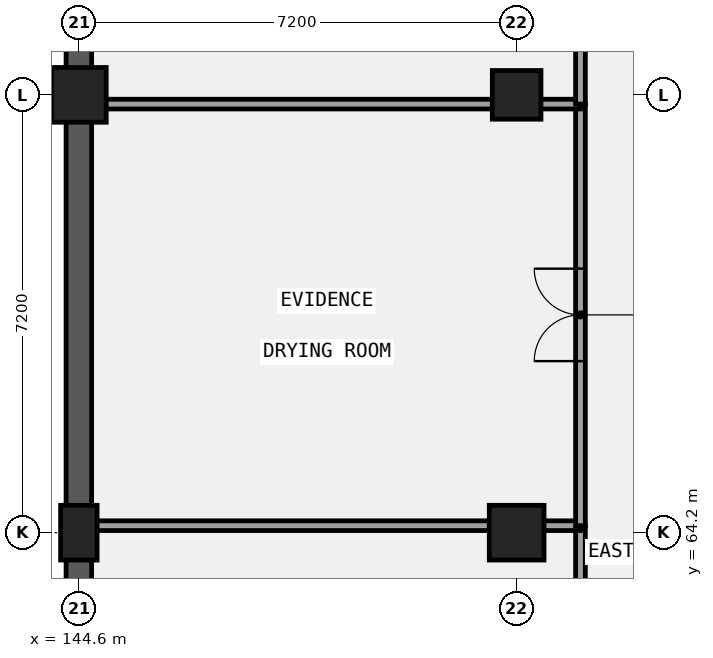
"""IFC4 building model, lengths in metres.
Left out: names, types, materials, properties, quantities, classifications, styles, units other than length and angle.
Written with IfcOpenShell. Run it as: python <this file> out.ifc"""

import sys

from ifc_helpers import new_model, si_unit, direction, frame, frame_2d, origin, origin_2d, place, context, subcontext, project, spatial, rectangle, extrude, element, fill, save


model = new_model("IFC4")
c1 = context("Model", 3, precision=1e-05, world=origin(), true_north=direction((0.0, 1.0)))
c2 = subcontext(c1, "Body", "Model", "MODEL_VIEW")
j1 = project(units=[si_unit("LENGTHUNIT", "METRE"), si_unit("PLANEANGLEUNIT", "RADIAN")], contexts=[c1])
p1 = place(None, origin())
s1 = spatial("IfcSite", under=j1, at=p1, CompositionType="ELEMENT")
p2 = place(p1, origin())
s2 = spatial("IfcBuilding", under=s1, at=p2, CompositionType="ELEMENT")
p3 = place(p2, frame((0.0, 0.0, -4.2)))
s3 = spatial("IfcBuildingStorey", under=s2, at=p3, CompositionType="ELEMENT", Elevation=-4.2)
p4 = place(p3, frame((144.6, 35.6, 0.0), z_axis=(0.0, 0.0, 1.0), x_axis=(0.0, 1.0, 0.0)))
e1 = element("IfcWall", 1, at=p4, inside=s3, PredefinedType="USERDEFINED", context=c2, shape_type="SweptSolid", body=[
    extrude(rectangle(XDim=42.8, YDim=0.42, at=frame_2d((21.4, 0.0))), origin(), (0.0, 0.0, 1.0), 2.98),
])
p5 = place(p3, frame((144.6, 64.2, 0.0), z_axis=(0.0, 0.0, 1.0), x_axis=(1.0, 0.0, 0.0)))
e2 = element("IfcColumn", 2, at=p5, inside=s3, PredefinedType="COLUMN", context=c2, shape_type="SweptSolid", body=[
    extrude(rectangle(XDim=0.6, YDim=0.9, at=origin_2d()), origin(), (0.0, 0.0, 1.0), 4.2),
])
for number, where, z_axis, x_axis in (
    (3, (144.6, 71.4, 0.0), (0.0, 0.0, 1.0), (1.0, 0.0, 0.0)),
    (4, (151.8, 64.2, 0.0), (0.0, 0.0, 1.0), (1.0, 0.0, 0.0)),
):
    element("IfcColumn", number, at=place(p3, frame(where, z_axis=z_axis, x_axis=x_axis)), inside=s3, PredefinedType="COLUMN", context=c2, shape_type="SweptSolid", body=[
        extrude(rectangle(XDim=0.9, YDim=0.9, at=origin_2d()), origin(), (0.0, 0.0, 1.0), 4.2),
    ])
p6 = place(p3, frame((151.8, 71.4, 0.0), z_axis=(0.0, 0.0, 1.0), x_axis=(1.0, 0.0, 0.0)))
e5 = element("IfcColumn", 5, at=p6, inside=s3, PredefinedType="COLUMN", context=c2, shape_type="SweptSolid", body=[
    extrude(rectangle(XDim=0.8, YDim=0.8, at=origin_2d()), origin(), (0.0, 0.0, 1.0), 4.2),
])
p7 = place(p3, frame((152.85, 57.383, 0.0), z_axis=(0.0, 0.0, 1.0), x_axis=(0.0, 1.0, 0.0)))
e6 = element("IfcWall", 6, at=p7, inside=s3, PredefinedType="PARTITIONING", context=c2, shape_type="SweptSolid", body=[
    extrude(rectangle(XDim=6.932, YDim=0.16, at=frame_2d((3.466, 0.0))), origin(), (0.0, 0.0, 1.0), 3.88),
])
p8 = place(p7, frame((2.706, 0.0, 0.0)))
e7 = element("IfcOpeningElement", 7, at=p8, cuts=e6, PredefinedType="OPENING", context=c2, shape_type="SweptSolid", body=[
    extrude(rectangle(XDim=1.52, YDim=2.1, at=frame_2d((0.76, 1.05))), frame((0.0, 0.09, 0.0), z_axis=(0.0, -1.0, 0.0), x_axis=(1.0, 0.0, 0.0)), (0.0, 0.0, 1.0), 0.18),
])
p9 = place(p3, frame((144.78, 64.315, 0.0), z_axis=(0.0, 0.0, 1.0), x_axis=(1.0, 0.0, 0.0)))
e8 = element("IfcWall", 8, at=p9, inside=s3, PredefinedType="PARTITIONING", context=c2, shape_type="SweptSolid", body=[
    extrude(rectangle(XDim=8.07, YDim=0.16, at=frame_2d((4.035, 0.0))), origin(), (0.0, 0.0, 1.0), 3.13),
])
p10 = place(p3, frame((152.85, 64.315, 0.0), z_axis=(0.0, 0.0, 1.0), x_axis=(0.0, 1.0, 0.0)))
e9 = element("IfcWall", 9, at=p10, inside=s3, PredefinedType="PARTITIONING", context=c2, shape_type="SweptSolid", body=[
    extrude(rectangle(XDim=6.933, YDim=0.16, at=frame_2d((3.467, 0.0))), origin(), (0.0, 0.0, 1.0), 3.88),
])
p11 = place(p10, frame((2.707, 0.0, 0.0)))
e10 = element("IfcOpeningElement", 10, at=p11, cuts=e9, PredefinedType="OPENING", context=c2, shape_type="SweptSolid", body=[
    extrude(rectangle(XDim=1.52, YDim=2.22, at=frame_2d((0.76, 1.11))), frame((0.0, 0.09, 0.0), z_axis=(0.0, -1.0, 0.0), x_axis=(1.0, 0.0, 0.0)), (0.0, 0.0, 1.0), 0.18),
])
p12 = place(p3, frame((144.78, 71.248, 0.0), z_axis=(0.0, 0.0, 1.0), x_axis=(1.0, 0.0, 0.0)))
e11 = element("IfcWall", 11, at=p12, inside=s3, PredefinedType="PARTITIONING", context=c2, shape_type="SweptSolid", body=[
    extrude(rectangle(XDim=8.07, YDim=0.16, at=frame_2d((4.035, 0.0))), origin(), (0.0, 0.0, 1.0), 3.08),
])
p13 = place(p3, frame((152.85, 71.248, 0.0), z_axis=(0.0, 0.0, 1.0), x_axis=(0.0, 1.0, 0.0)))
e12 = element("IfcWall", 12, at=p13, inside=s3, PredefinedType="PARTITIONING", context=c2, shape_type="SweptSolid", body=[
    extrude(rectangle(XDim=6.932, YDim=0.16, at=frame_2d((3.466, 0.0))), origin(), (0.0, 0.0, 1.0), 3.88),
])
p14 = place(p13, frame((2.706, 0.0, 0.0)))
e13 = element("IfcOpeningElement", 13, at=p14, cuts=e12, PredefinedType="OPENING", context=c2, shape_type="SweptSolid", body=[
    extrude(rectangle(XDim=1.52, YDim=2.35, at=frame_2d((0.76, 1.175))), frame((0.0, 0.09, 0.0), z_axis=(0.0, -1.0, 0.0), x_axis=(1.0, 0.0, 0.0)), (0.0, 0.0, 1.0), 0.18),
])
p15 = place(p11, frame((1.52, 0.0, 0.0), z_axis=(0.0, 0.0, 1.0), x_axis=(-1.0, 0.0, 0.0)))
e14 = element("IfcDoor", 14, at=p15, inside=s3, OperationType="DOUBLE_DOOR_SINGLE_SWING", PredefinedType="DOOR", context=c2, shape_type="SweptSolid", body=[
    extrude(rectangle(XDim=1.52, YDim=2.22, at=frame_2d((0.76, 1.11))), frame((0.0, 0.025, 0.0), z_axis=(0.0, -1.0, 0.0), x_axis=(1.0, 0.0, 0.0)), (0.0, 0.0, 1.0), 0.05),
])
fill(e10, e14)
save(model, sys.argv[1])
